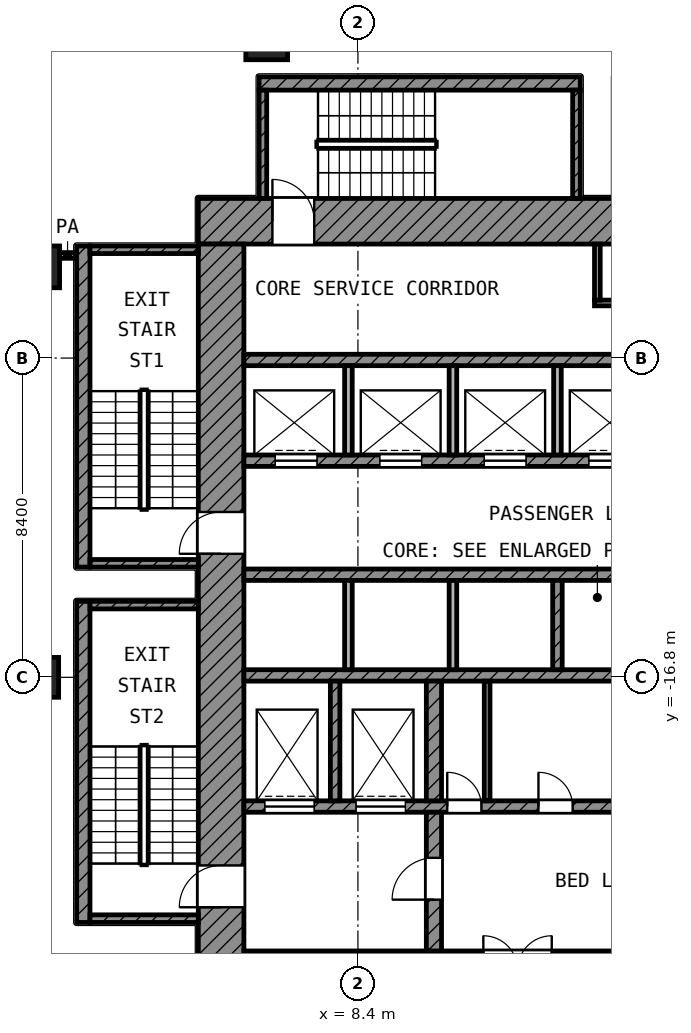
"""IFC4 building model, lengths in metres.
Left out: names, types, materials, properties, quantities, classifications, styles, units other than length and angle.
Written with IfcOpenShell. Run it as: python <this file> out.ifc"""

import sys

from ifc_helpers import new_model, si_unit, direction, frame, frame_2d, origin, origin_2d, place, context, subcontext, project, spatial, rectangle, extrude, element, fill, save


model = new_model("IFC4")
c1 = context("Model", 3, precision=1e-05, world=origin(), true_north=direction((0.0, 1.0)))
c2 = subcontext(c1, "Body", "Model", "MODEL_VIEW")
j1 = project(units=[si_unit("LENGTHUNIT", "METRE"), si_unit("PLANEANGLEUNIT", "RADIAN")], contexts=[c1])
p1 = place(None, origin())
s1 = spatial("IfcSite", under=j1, at=p1, CompositionType="ELEMENT")
p2 = place(p1, origin())
s2 = spatial("IfcBuilding", under=s1, at=p2, CompositionType="ELEMENT")
p3 = place(p2, frame((0.0, 0.0, 128.2)))
s3 = spatial("IfcBuildingStorey", under=s2, at=p3, CompositionType="ELEMENT", Elevation=128.2)
for number, where, z_axis, x_axis in (
    (1, (6.0, 0.0, 0.0), (0.0, 0.0, 1.0), (1.0, 0.0, 0.0)),
    (2, (0.0, -6.0, 0.0), (0.0, 0.0, 1.0), (1.0, 0.0, 0.0)),
):
    element("IfcColumn", number, at=place(p3, frame(where, z_axis=z_axis, x_axis=x_axis)), inside=s3, PredefinedType="COLUMN", context=c2, shape_type="SweptSolid", body=[
        extrude(rectangle(XDim=1.1, YDim=1.1, at=origin_2d()), origin(), (0.0, 0.0, 1.0), 4.2),
    ])
p4 = place(p3, frame((0.0, -16.8, 0.0), z_axis=(0.0, 0.0, 1.0), x_axis=(1.0, 0.0, 0.0)))
e3 = element("IfcColumn", 3, at=p4, inside=s3, PredefinedType="COLUMN", context=c2, shape_type="SweptSolid", body=[
    extrude(rectangle(XDim=1.05, YDim=1.05, at=origin_2d()), origin(), (0.0, 0.0, 1.0), 4.2),
])
p5 = place(p3, frame((4.2, -4.8, 0.0), z_axis=(0.0, 0.0, 1.0), x_axis=(1.0, 0.0, 0.0)))
e4 = element("IfcWall", 4, at=p5, inside=s3, PredefinedType="SHEAR", context=c2, shape_type="SweptSolid", body=[
    extrude(rectangle(XDim=20.8, YDim=1.2, at=frame_2d((10.4, 0.0))), origin(), (0.0, 0.0, 1.0), 3.6),
])
p6 = place(p5, frame((1.95, 0.0, 0.0)))
e5 = element("IfcOpeningElement", 5, at=p6, cuts=e4, PredefinedType="OPENING", context=c2, shape_type="SweptSolid", body=[
    extrude(rectangle(XDim=1.1, YDim=2.1, at=frame_2d((0.55, 1.05))), frame((0.0, 0.61, 0.0), z_axis=(0.0, -1.0, 0.0), x_axis=(1.0, 0.0, 0.0)), (0.0, 0.0, 1.0), 1.22),
])
p7 = place(p5, frame((17.95, 0.0, 0.0)))
e6 = element("IfcOpeningElement", 6, at=p7, cuts=e4, PredefinedType="OPENING", context=c2, shape_type="SweptSolid", body=[
    extrude(rectangle(XDim=1.1, YDim=2.1, at=frame_2d((0.55, 1.05))), frame((0.0, 0.61, 0.0), z_axis=(0.0, -1.0, 0.0), x_axis=(1.0, 0.0, 0.0)), (0.0, 0.0, 1.0), 1.22),
])
p8 = place(p3, frame((4.8, -25.0, 0.0), z_axis=(0.0, 0.0, 1.0), x_axis=(0.0, 1.0, 0.0)))
e7 = element("IfcWall", 7, at=p8, inside=s3, PredefinedType="SHEAR", context=c2, shape_type="SweptSolid", body=[
    extrude(rectangle(XDim=19.6, YDim=1.2, at=frame_2d((9.8, 0.0))), origin(), (0.0, 0.0, 1.0), 3.6),
])
p9 = place(p8, frame((11.45, 0.0, 0.0)))
e8 = element("IfcOpeningElement", 8, at=p9, cuts=e7, PredefinedType="OPENING", context=c2, shape_type="SweptSolid", body=[
    extrude(rectangle(XDim=1.1, YDim=2.1, at=frame_2d((0.55, 1.05))), frame((0.0, 0.61, 0.0), z_axis=(0.0, -1.0, 0.0), x_axis=(1.0, 0.0, 0.0)), (0.0, 0.0, 1.0), 1.22),
])
p10 = place(p8, frame((2.15, 0.0, 0.0)))
e9 = element("IfcOpeningElement", 9, at=p10, cuts=e7, PredefinedType="OPENING", context=c2, shape_type="SweptSolid", body=[
    extrude(rectangle(XDim=1.1, YDim=2.1, at=frame_2d((0.55, 1.05))), frame((0.0, 0.61, 0.0), z_axis=(0.0, -1.0, 0.0), x_axis=(1.0, 0.0, 0.0)), (0.0, 0.0, 1.0), 1.22),
])
p11 = place(p3, frame((5.4, -24.5, 0.0), z_axis=(0.0, 0.0, 1.0), x_axis=(1.0, 0.0, 0.0)))
e10 = element("IfcWall", 10, at=p11, inside=s3, PredefinedType="SHEAR", context=c2, shape_type="SweptSolid", body=[
    extrude(rectangle(XDim=18.6, YDim=1.0, at=frame_2d((9.3, 0.0))), origin(), (0.0, 0.0, 1.0), 3.6),
])
p12 = place(p11, frame((6.3, 0.0, 0.0)))
e11 = element("IfcOpeningElement", 11, at=p12, cuts=e10, PredefinedType="OPENING", context=c2, shape_type="SweptSolid", body=[
    extrude(rectangle(XDim=1.8, YDim=2.1, at=frame_2d((0.9, 1.05))), frame((0.0, 0.51, 0.0), z_axis=(0.0, -1.0, 0.0), x_axis=(1.0, 0.0, 0.0)), (0.0, 0.0, 1.0), 1.02),
])
p13 = place(p3, frame((5.4, -8.45, 0.0), z_axis=(0.0, 0.0, 1.0), x_axis=(1.0, 0.0, 0.0)))
e12 = element("IfcWall", 12, at=p13, inside=s3, PredefinedType="SHEAR", context=c2, shape_type="SweptSolid", body=[
    extrude(rectangle(XDim=16.65, YDim=0.3, at=frame_2d((8.325, 0.0))), origin(), (0.0, 0.0, 1.0), 3.6),
])
p14 = place(p3, frame((5.4, -11.1, 0.0), z_axis=(0.0, 0.0, 1.0), x_axis=(1.0, 0.0, 0.0)))
e13 = element("IfcWall", 13, at=p14, inside=s3, PredefinedType="SHEAR", context=c2, shape_type="SweptSolid", body=[
    extrude(rectangle(XDim=16.65, YDim=0.3, at=frame_2d((8.325, 0.0))), origin(), (0.0, 0.0, 1.0), 3.6),
])
p15 = place(p14, frame((0.825, 0.0, 0.0)))
e14 = element("IfcOpeningElement", 14, at=p15, cuts=e13, PredefinedType="OPENING", context=c2, shape_type="SweptSolid", body=[
    extrude(rectangle(XDim=1.1, YDim=2.1, at=frame_2d((0.55, 1.05))), frame((0.0, 0.16, 0.0), z_axis=(0.0, -1.0, 0.0), x_axis=(1.0, 0.0, 0.0)), (0.0, 0.0, 1.0), 0.32),
])
p16 = place(p14, frame((3.575, 0.0, 0.0)))
e15 = element("IfcOpeningElement", 15, at=p16, cuts=e13, PredefinedType="OPENING", context=c2, shape_type="SweptSolid", body=[
    extrude(rectangle(XDim=1.1, YDim=2.1, at=frame_2d((0.55, 1.05))), frame((0.0, 0.16, 0.0), z_axis=(0.0, -1.0, 0.0), x_axis=(1.0, 0.0, 0.0)), (0.0, 0.0, 1.0), 0.32),
])
p17 = place(p14, frame((6.325, 0.0, 0.0)))
e16 = element("IfcOpeningElement", 16, at=p17, cuts=e13, PredefinedType="OPENING", context=c2, shape_type="SweptSolid", body=[
    extrude(rectangle(XDim=1.1, YDim=2.1, at=frame_2d((0.55, 1.05))), frame((0.0, 0.16, 0.0), z_axis=(0.0, -1.0, 0.0), x_axis=(1.0, 0.0, 0.0)), (0.0, 0.0, 1.0), 0.32),
])
p18 = place(p14, frame((9.075, 0.0, 0.0)))
e17 = element("IfcOpeningElement", 17, at=p18, cuts=e13, PredefinedType="OPENING", context=c2, shape_type="SweptSolid", body=[
    extrude(rectangle(XDim=1.1, YDim=2.1, at=frame_2d((0.55, 1.05))), frame((0.0, 0.16, 0.0), z_axis=(0.0, -1.0, 0.0), x_axis=(1.0, 0.0, 0.0)), (0.0, 0.0, 1.0), 0.32),
])
for number, where, z_axis, x_axis in (
    (18, (5.4, -14.1, 0.0), (0.0, 0.0, 1.0), (1.0, 0.0, 0.0)),
    (19, (5.4, -16.75, 0.0), (0.0, 0.0, 1.0), (1.0, 0.0, 0.0)),
):
    element("IfcWall", number, at=place(p3, frame(where, z_axis=z_axis, x_axis=x_axis)), inside=s3, PredefinedType="SHEAR", context=c2, shape_type="SweptSolid", body=[
        extrude(rectangle(XDim=16.65, YDim=0.3, at=frame_2d((8.325, 0.0))), origin(), (0.0, 0.0, 1.0), 3.6),
    ])
p19 = place(p3, frame((5.4, -20.2, 0.0), z_axis=(0.0, 0.0, 1.0), x_axis=(1.0, 0.0, 0.0)))
e20 = element("IfcWall", 20, at=p19, inside=s3, PredefinedType="SHEAR", context=c2, shape_type="SweptSolid", body=[
    extrude(rectangle(XDim=14.65, YDim=0.3, at=frame_2d((7.325, 0.0))), origin(), (0.0, 0.0, 1.0), 3.6),
])
p20 = place(p19, frame((10.55, 0.0, 0.0)))
e21 = element("IfcOpeningElement", 21, at=p20, cuts=e20, PredefinedType="OPENING", context=c2, shape_type="SweptSolid", body=[
    extrude(rectangle(XDim=1.3, YDim=2.1, at=frame_2d((0.65, 1.05))), frame((0.0, 0.16, 0.0), z_axis=(0.0, -1.0, 0.0), x_axis=(1.0, 0.0, 0.0)), (0.0, 0.0, 1.0), 0.32),
])
p21 = place(p19, frame((12.95, 0.0, 0.0)))
e22 = element("IfcOpeningElement", 22, at=p21, cuts=e20, PredefinedType="OPENING", context=c2, shape_type="SweptSolid", body=[
    extrude(rectangle(XDim=1.3, YDim=2.1, at=frame_2d((0.65, 1.05))), frame((0.0, 0.16, 0.0), z_axis=(0.0, -1.0, 0.0), x_axis=(1.0, 0.0, 0.0)), (0.0, 0.0, 1.0), 0.32),
])
p22 = place(p19, frame((0.55, 0.0, 0.0)))
e23 = element("IfcOpeningElement", 23, at=p22, cuts=e20, PredefinedType="OPENING", context=c2, shape_type="SweptSolid", body=[
    extrude(rectangle(XDim=1.3, YDim=2.1, at=frame_2d((0.65, 1.05))), frame((0.0, 0.16, 0.0), z_axis=(0.0, -1.0, 0.0), x_axis=(1.0, 0.0, 0.0)), (0.0, 0.0, 1.0), 0.32),
])
p23 = place(p19, frame((2.95, 0.0, 0.0)))
e24 = element("IfcOpeningElement", 24, at=p23, cuts=e20, PredefinedType="OPENING", context=c2, shape_type="SweptSolid", body=[
    extrude(rectangle(XDim=1.3, YDim=2.1, at=frame_2d((0.65, 1.05))), frame((0.0, 0.16, 0.0), z_axis=(0.0, -1.0, 0.0), x_axis=(1.0, 0.0, 0.0)), (0.0, 0.0, 1.0), 0.32),
])
p24 = place(p19, frame((5.35, 0.0, 0.0)))
e25 = element("IfcOpeningElement", 25, at=p24, cuts=e20, PredefinedType="OPENING", context=c2, shape_type="SweptSolid", body=[
    extrude(rectangle(XDim=0.9, YDim=2.1, at=frame_2d((0.45, 1.05))), frame((0.0, 0.16, 0.0), z_axis=(0.0, -1.0, 0.0), x_axis=(1.0, 0.0, 0.0)), (0.0, 0.0, 1.0), 0.32),
])
p25 = place(p19, frame((7.75, 0.0, 0.0)))
e26 = element("IfcOpeningElement", 26, at=p25, cuts=e20, PredefinedType="OPENING", context=c2, shape_type="SweptSolid", body=[
    extrude(rectangle(XDim=0.9, YDim=2.1, at=frame_2d((0.45, 1.05))), frame((0.0, 0.16, 0.0), z_axis=(0.0, -1.0, 0.0), x_axis=(1.0, 0.0, 0.0)), (0.0, 0.0, 1.0), 0.32),
])
p26 = place(p3, frame((10.4, -24.0, 0.0), z_axis=(0.0, 0.0, 1.0), x_axis=(0.0, 1.0, 0.0)))
e27 = element("IfcWall", 27, at=p26, inside=s3, PredefinedType="SHEAR", context=c2, shape_type="SweptSolid", body=[
    extrude(rectangle(XDim=3.65, YDim=0.4, at=frame_2d((1.825, 0.0))), origin(), (0.0, 0.0, 1.0), 3.6),
])
p27 = place(p26, frame((1.35, 0.0, 0.0)))
e28 = element("IfcOpeningElement", 28, at=p27, cuts=e27, PredefinedType="OPENING", context=c2, shape_type="SweptSolid", body=[
    extrude(rectangle(XDim=1.1, YDim=2.1, at=frame_2d((0.55, 1.05))), frame((0.0, 0.21, 0.0), z_axis=(0.0, -1.0, 0.0), x_axis=(1.0, 0.0, 0.0)), (0.0, 0.0, 1.0), 0.42),
])
p28 = place(p3, frame((10.4, -20.05, 0.0), z_axis=(0.0, 0.0, 1.0), x_axis=(0.0, 1.0, 0.0)))
e29 = element("IfcWall", 29, at=p28, inside=s3, PredefinedType="SHEAR", context=c2, shape_type="SweptSolid", body=[
    extrude(rectangle(XDim=3.15, YDim=0.4, at=frame_2d((1.575, 0.0))), origin(), (0.0, 0.0, 1.0), 3.6),
])
p29 = place(p3, frame((7.8, -20.05, 0.0), z_axis=(0.0, 0.0, 1.0), x_axis=(0.0, 1.0, 0.0)))
e30 = element("IfcWall", 30, at=p29, inside=s3, PredefinedType="SHEAR", context=c2, shape_type="SweptSolid", body=[
    extrude(rectangle(XDim=3.15, YDim=0.25, at=frame_2d((1.575, 0.0))), origin(), (0.0, 0.0, 1.0), 3.6),
])
for number, where, z_axis, x_axis in (
    (31, (8.15, -10.95, 0.0), (0.0, 0.0, 1.0), (0.0, 1.0, 0.0)),
    (32, (10.9, -10.95, 0.0), (0.0, 0.0, 1.0), (0.0, 1.0, 0.0)),
    (33, (13.65, -10.95, 0.0), (0.0, 0.0, 1.0), (0.0, 1.0, 0.0)),
):
    element("IfcWall", number, at=place(p3, frame(where, z_axis=z_axis, x_axis=x_axis)), inside=s3, PredefinedType="PARTITIONING", context=c2, shape_type="SweptSolid", body=[
        extrude(rectangle(XDim=2.35, YDim=0.2, at=frame_2d((1.175, 0.0))), origin(), (0.0, 0.0, 1.0), 3.6),
    ])
for number, where, z_axis, x_axis in (
    (34, (8.15, -16.6, 0.0), (0.0, 0.0, 1.0), (0.0, 1.0, 0.0)),
    (35, (10.9, -16.6, 0.0), (0.0, 0.0, 1.0), (0.0, 1.0, 0.0)),
):
    element("IfcWall", number, at=place(p3, frame(where, z_axis=z_axis, x_axis=x_axis)), inside=s3, PredefinedType="PARTITIONING", context=c2, shape_type="SweptSolid", body=[
        extrude(rectangle(XDim=2.35, YDim=0.2, at=frame_2d((1.175, 0.0))), origin(), (0.0, 0.0, 1.0), 3.6),
    ])
p30 = place(p3, frame((13.65, -16.6, 0.0), z_axis=(0.0, 0.0, 1.0), x_axis=(0.0, 1.0, 0.0)))
e36 = element("IfcWall", 36, at=p30, inside=s3, PredefinedType="SHEAR", context=c2, shape_type="SweptSolid", body=[
    extrude(rectangle(XDim=2.35, YDim=0.25, at=frame_2d((1.175, 0.0))), origin(), (0.0, 0.0, 1.0), 3.6),
])
p31 = place(p3, frame((14.625, -6.95, 0.0), z_axis=(0.0, 0.0, 1.0), x_axis=(1.0, 0.0, 0.0)))
e37 = element("IfcWall", 37, at=p31, inside=s3, PredefinedType="PARTITIONING", context=c2, shape_type="SweptSolid", body=[
    extrude(rectangle(XDim=6.45, YDim=0.15, at=frame_2d((3.225, 0.0))), origin(), (0.0, 0.0, 1.0), 3.6),
])
p32 = place(p31, frame((0.525, 0.0, 0.0)))
e38 = element("IfcOpeningElement", 38, at=p32, cuts=e37, PredefinedType="OPENING", context=c2, shape_type="SweptSolid", body=[
    extrude(rectangle(XDim=0.9, YDim=2.1, at=frame_2d((0.45, 1.05))), frame((0.0, 0.085, 0.0), z_axis=(0.0, -1.0, 0.0), x_axis=(1.0, 0.0, 0.0)), (0.0, 0.0, 1.0), 0.17),
])
p33 = place(p31, frame((2.025, 0.0, 0.0)))
e39 = element("IfcOpeningElement", 39, at=p33, cuts=e37, PredefinedType="OPENING", context=c2, shape_type="SweptSolid", body=[
    extrude(rectangle(XDim=0.9, YDim=2.1, at=frame_2d((0.45, 1.05))), frame((0.0, 0.085, 0.0), z_axis=(0.0, -1.0, 0.0), x_axis=(1.0, 0.0, 0.0)), (0.0, 0.0, 1.0), 0.17),
])
p34 = place(p31, frame((3.825, 0.0, 0.0)))
e40 = element("IfcOpeningElement", 40, at=p34, cuts=e37, PredefinedType="OPENING", context=c2, shape_type="SweptSolid", body=[
    extrude(rectangle(XDim=0.9, YDim=2.1, at=frame_2d((0.45, 1.05))), frame((0.0, 0.085, 0.0), z_axis=(0.0, -1.0, 0.0), x_axis=(1.0, 0.0, 0.0)), (0.0, 0.0, 1.0), 0.17),
])
p35 = place(p31, frame((5.475, 0.0, 0.0)))
e41 = element("IfcOpeningElement", 41, at=p35, cuts=e37, PredefinedType="OPENING", context=c2, shape_type="SweptSolid", body=[
    extrude(rectangle(XDim=0.9, YDim=2.1, at=frame_2d((0.45, 1.05))), frame((0.0, 0.085, 0.0), z_axis=(0.0, -1.0, 0.0), x_axis=(1.0, 0.0, 0.0)), (0.0, 0.0, 1.0), 0.17),
])
p36 = place(p3, frame((11.8, -20.05, 0.0), z_axis=(0.0, 0.0, 1.0), x_axis=(0.0, 1.0, 0.0)))
e42 = element("IfcWall", 42, at=p36, inside=s3, PredefinedType="PARTITIONING", context=c2, shape_type="SweptSolid", body=[
    extrude(rectangle(XDim=3.15, YDim=0.15, at=frame_2d((1.575, 0.0))), origin(), (0.0, 0.0, 1.0), 3.6),
])
p37 = place(p3, frame((14.7, -6.875, 0.0), z_axis=(0.0, 0.0, 1.0), x_axis=(0.0, 1.0, 0.0)))
e43 = element("IfcWall", 43, at=p37, inside=s3, PredefinedType="PARTITIONING", context=c2, shape_type="SweptSolid", body=[
    extrude(rectangle(XDim=1.475, YDim=0.15, at=frame_2d((0.738, 0.0))), origin(), (0.0, 0.0, 1.0), 3.6),
])
p38 = place(p3, frame((1.175, -13.9, 0.0), z_axis=(0.0, 0.0, 1.0), x_axis=(0.0, 1.0, 0.0)))
e44 = element("IfcWall", 44, at=p38, inside=s3, PredefinedType="SHEAR", context=c2, shape_type="SweptSolid", body=[
    extrude(rectangle(XDim=8.45, YDim=0.35, at=frame_2d((4.225, 0.0))), origin(), (0.0, 0.0, 1.0), 3.6),
])
for number, where, z_axis, x_axis in (
    (45, (1.35, -5.55, 0.0), (0.0, 0.0, 1.0), (1.0, 0.0, 0.0)),
    (46, (1.35, -13.8, 0.0), (0.0, 0.0, 1.0), (1.0, 0.0, 0.0)),
):
    element("IfcWall", number, at=place(p3, frame(where, z_axis=z_axis, x_axis=x_axis)), inside=s3, PredefinedType="SHEAR", context=c2, shape_type="SweptSolid", body=[
        extrude(rectangle(XDim=2.85, YDim=0.2, at=frame_2d((1.425, 0.0))), origin(), (0.0, 0.0, 1.0), 3.6),
    ])
p39 = place(p3, frame((1.175, -23.25, 0.0), z_axis=(0.0, 0.0, 1.0), x_axis=(0.0, 1.0, 0.0)))
e47 = element("IfcWall", 47, at=p39, inside=s3, PredefinedType="SHEAR", context=c2, shape_type="SweptSolid", body=[
    extrude(rectangle(XDim=8.45, YDim=0.35, at=frame_2d((4.225, 0.0))), origin(), (0.0, 0.0, 1.0), 3.6),
])
for number, where, z_axis, x_axis in (
    (48, (1.35, -14.9, 0.0), (0.0, 0.0, 1.0), (1.0, 0.0, 0.0)),
    (49, (1.35, -23.15, 0.0), (0.0, 0.0, 1.0), (1.0, 0.0, 0.0)),
):
    element("IfcWall", number, at=place(p3, frame(where, z_axis=z_axis, x_axis=x_axis)), inside=s3, PredefinedType="SHEAR", context=c2, shape_type="SweptSolid", body=[
        extrude(rectangle(XDim=2.85, YDim=0.2, at=frame_2d((1.425, 0.0))), origin(), (0.0, 0.0, 1.0), 3.6),
    ])
p40 = place(p3, frame((5.8, -1.175, 0.0), z_axis=(0.0, 0.0, 1.0), x_axis=(1.0, 0.0, 0.0)))
e50 = element("IfcWall", 50, at=p40, inside=s3, PredefinedType="SHEAR", context=c2, shape_type="SweptSolid", body=[
    extrude(rectangle(XDim=8.45, YDim=0.35, at=frame_2d((4.225, 0.0))), origin(), (0.0, 0.0, 1.0), 3.6),
])
for number, where, z_axis, x_axis in (
    (51, (5.9, -4.2, 0.0), (0.0, 0.0, 1.0), (0.0, 1.0, 0.0)),
    (52, (14.15, -4.2, 0.0), (0.0, 0.0, 1.0), (0.0, 1.0, 0.0)),
):
    element("IfcWall", number, at=place(p3, frame(where, z_axis=z_axis, x_axis=x_axis)), inside=s3, PredefinedType="SHEAR", context=c2, shape_type="SweptSolid", body=[
        extrude(rectangle(XDim=2.85, YDim=0.2, at=frame_2d((1.425, 0.0))), origin(), (0.0, 0.0, 1.0), 3.6),
    ])
p41 = place(p3, frame((0.55, -5.7, 0.0), z_axis=(0.0, 0.0, 1.0), x_axis=(1.0, 0.0, 0.0)))
e53 = element("IfcWall", 53, at=p41, inside=s3, PredefinedType="PARTITIONING", context=c2, shape_type="SweptSolid", body=[
    extrude(rectangle(XDim=0.42, YDim=0.15, at=frame_2d((0.21, 0.0))), origin(), (0.0, 0.0, 1.0), 3.6),
])
p42 = place(p15, origin())
e54 = element("IfcDoor", 54, at=p42, inside=s3, OperationType="DOUBLE_DOOR_SLIDING", PredefinedType="DOOR", context=c2, shape_type="SweptSolid", body=[
    extrude(rectangle(XDim=1.1, YDim=2.1, at=frame_2d((0.55, 1.05))), frame((0.0, 0.025, 0.0), z_axis=(0.0, -1.0, 0.0), x_axis=(1.0, 0.0, 0.0)), (0.0, 0.0, 1.0), 0.05),
])
fill(e14, e54)
p43 = place(p16, origin())
e55 = element("IfcDoor", 55, at=p43, inside=s3, OperationType="DOUBLE_DOOR_SLIDING", PredefinedType="DOOR", context=c2, shape_type="SweptSolid", body=[
    extrude(rectangle(XDim=1.1, YDim=2.1, at=frame_2d((0.55, 1.05))), frame((0.0, 0.025, 0.0), z_axis=(0.0, -1.0, 0.0), x_axis=(1.0, 0.0, 0.0)), (0.0, 0.0, 1.0), 0.05),
])
fill(e15, e55)
p44 = place(p17, origin())
e56 = element("IfcDoor", 56, at=p44, inside=s3, OperationType="DOUBLE_DOOR_SLIDING", PredefinedType="DOOR", context=c2, shape_type="SweptSolid", body=[
    extrude(rectangle(XDim=1.1, YDim=2.1, at=frame_2d((0.55, 1.05))), frame((0.0, 0.025, 0.0), z_axis=(0.0, -1.0, 0.0), x_axis=(1.0, 0.0, 0.0)), (0.0, 0.0, 1.0), 0.05),
])
fill(e16, e56)
p45 = place(p18, origin())
e57 = element("IfcDoor", 57, at=p45, inside=s3, OperationType="DOUBLE_DOOR_SLIDING", PredefinedType="DOOR", context=c2, shape_type="SweptSolid", body=[
    extrude(rectangle(XDim=1.1, YDim=2.1, at=frame_2d((0.55, 1.05))), frame((0.0, 0.025, 0.0), z_axis=(0.0, -1.0, 0.0), x_axis=(1.0, 0.0, 0.0)), (0.0, 0.0, 1.0), 0.05),
])
fill(e17, e57)
p46 = place(p22, origin())
e58 = element("IfcDoor", 58, at=p46, inside=s3, OperationType="DOUBLE_DOOR_SLIDING", PredefinedType="DOOR", context=c2, shape_type="SweptSolid", body=[
    extrude(rectangle(XDim=1.3, YDim=2.1, at=frame_2d((0.65, 1.05))), frame((0.0, 0.025, 0.0), z_axis=(0.0, -1.0, 0.0), x_axis=(1.0, 0.0, 0.0)), (0.0, 0.0, 1.0), 0.05),
])
fill(e23, e58)
p47 = place(p23, origin())
e59 = element("IfcDoor", 59, at=p47, inside=s3, OperationType="DOUBLE_DOOR_SLIDING", PredefinedType="DOOR", context=c2, shape_type="SweptSolid", body=[
    extrude(rectangle(XDim=1.3, YDim=2.1, at=frame_2d((0.65, 1.05))), frame((0.0, 0.025, 0.0), z_axis=(0.0, -1.0, 0.0), x_axis=(1.0, 0.0, 0.0)), (0.0, 0.0, 1.0), 0.05),
])
fill(e24, e59)
p48 = place(p9, origin())
e60 = element("IfcDoor", 60, at=p48, inside=s3, OperationType="SINGLE_SWING_LEFT", PredefinedType="DOOR", context=c2, shape_type="SweptSolid", body=[
    extrude(rectangle(XDim=1.1, YDim=2.1, at=frame_2d((0.55, 1.05))), frame((0.0, 0.025, 0.0), z_axis=(0.0, -1.0, 0.0), x_axis=(1.0, 0.0, 0.0)), (0.0, 0.0, 1.0), 0.05),
])
fill(e8, e60)
p49 = place(p10, origin())
e61 = element("IfcDoor", 61, at=p49, inside=s3, OperationType="SINGLE_SWING_LEFT", PredefinedType="DOOR", context=c2, shape_type="SweptSolid", body=[
    extrude(rectangle(XDim=1.1, YDim=2.1, at=frame_2d((0.55, 1.05))), frame((0.0, 0.025, 0.0), z_axis=(0.0, -1.0, 0.0), x_axis=(1.0, 0.0, 0.0)), (0.0, 0.0, 1.0), 0.05),
])
fill(e9, e61)
p50 = place(p6, origin())
e62 = element("IfcDoor", 62, at=p50, inside=s3, OperationType="SINGLE_SWING_LEFT", PredefinedType="DOOR", context=c2, shape_type="SweptSolid", body=[
    extrude(rectangle(XDim=1.1, YDim=2.1, at=frame_2d((0.55, 1.05))), frame((0.0, 0.025, 0.0), z_axis=(0.0, -1.0, 0.0), x_axis=(1.0, 0.0, 0.0)), (0.0, 0.0, 1.0), 0.05),
])
fill(e5, e62)
p51 = place(p27, origin())
e63 = element("IfcDoor", 63, at=p51, inside=s3, OperationType="SINGLE_SWING_LEFT", PredefinedType="DOOR", context=c2, shape_type="SweptSolid", body=[
    extrude(rectangle(XDim=1.1, YDim=2.1, at=frame_2d((0.55, 1.05))), frame((0.0, 0.025, 0.0), z_axis=(0.0, -1.0, 0.0), x_axis=(1.0, 0.0, 0.0)), (0.0, 0.0, 1.0), 0.05),
])
fill(e28, e63)
p52 = place(p24, origin())
e64 = element("IfcDoor", 64, at=p52, inside=s3, OperationType="SINGLE_SWING_LEFT", PredefinedType="DOOR", context=c2, shape_type="SweptSolid", body=[
    extrude(rectangle(XDim=0.9, YDim=2.1, at=frame_2d((0.45, 1.05))), frame((0.0, 0.025, 0.0), z_axis=(0.0, -1.0, 0.0), x_axis=(1.0, 0.0, 0.0)), (0.0, 0.0, 1.0), 0.05),
])
fill(e25, e64)
p53 = place(p25, origin())
e65 = element("IfcDoor", 65, at=p53, inside=s3, OperationType="SINGLE_SWING_LEFT", PredefinedType="DOOR", context=c2, shape_type="SweptSolid", body=[
    extrude(rectangle(XDim=0.9, YDim=2.1, at=frame_2d((0.45, 1.05))), frame((0.0, 0.025, 0.0), z_axis=(0.0, -1.0, 0.0), x_axis=(1.0, 0.0, 0.0)), (0.0, 0.0, 1.0), 0.05),
])
fill(e26, e65)
save(model, sys.argv[1])
